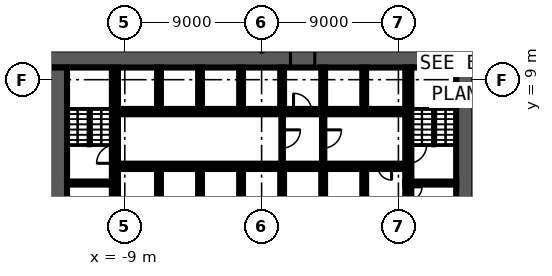
"""IFC4 building model, lengths in metres.
Left out: names, types, materials, properties, quantities, classifications, styles, units other than length and angle.
Written with IfcOpenShell. Run it as: python <this file> out.ifc"""

import sys

from ifc_helpers import new_model, si_unit, direction, frame, frame_2d, origin, place, context, subcontext, project, spatial, rectangle, extrude, element, fill, save


model = new_model("IFC4")
c1 = context("Model", 3, precision=1e-05, world=origin(), true_north=direction((0.0, 1.0)))
c2 = subcontext(c1, "Body", "Model", "MODEL_VIEW")
j1 = project(units=[si_unit("LENGTHUNIT", "METRE"), si_unit("PLANEANGLEUNIT", "RADIAN")], contexts=[c1])
p1 = place(None, origin())
s1 = spatial("IfcSite", under=j1, at=p1, CompositionType="ELEMENT")
p2 = place(p1, origin())
s2 = spatial("IfcBuilding", under=s1, at=p2, CompositionType="ELEMENT")
p3 = place(p2, frame((0.0, 0.0, -11.5)))
s3 = spatial("IfcBuildingStorey", under=s2, at=p3, CompositionType="ELEMENT", Elevation=-11.5)
p4 = place(p3, frame((-14.0, 10.4, 0.0), z_axis=(0.0, 0.0, 1.0), x_axis=(1.0, 0.0, 0.0)))
e1 = element("IfcWall", 1, at=p4, inside=s3, PredefinedType="SHEAR", context=c2, shape_type="SweptSolid", body=[
    extrude(rectangle(XDim=28.0, YDim=1.2, at=frame_2d((14.0, 0.0))), origin(), (0.0, 0.0, 1.0), 5.1),
])
p5 = place(p4, frame((15.9, 0.0, 0.0)))
e2 = element("IfcOpeningElement", 2, at=p5, cuts=e1, PredefinedType="OPENING", context=c2, shape_type="SweptSolid", body=[
    extrude(rectangle(XDim=1.6, YDim=2.1, at=frame_2d((0.8, 1.05))), frame((0.0, 0.61, 0.0), z_axis=(0.0, -1.0, 0.0), x_axis=(1.0, 0.0, 0.0)), (0.0, 0.0, 1.0), 1.22),
])
for number, where, z_axis, x_axis in (
    (3, (13.4, 9.8, 0.0), (0.0, 0.0, 1.0), (0.0, -1.0, 0.0)),
    (4, (-13.4, -9.8, 0.0), (0.0, 0.0, 1.0), (0.0, 1.0, 0.0)),
):
    element("IfcWall", number, at=place(p3, frame(where, z_axis=z_axis, x_axis=x_axis)), inside=s3, PredefinedType="SHEAR", context=c2, shape_type="SweptSolid", body=[
        extrude(rectangle(XDim=19.6, YDim=1.2, at=frame_2d((9.8, 0.0))), origin(), (0.0, 0.0, 1.0), 5.1),
    ])
p6 = place(p3, frame((9.65, 2.1, 0.0), z_axis=(0.0, 0.0, 1.0), x_axis=(0.0, -1.0, 0.0)))
e5 = element("IfcWall", 5, at=p6, inside=s3, PredefinedType="SHEAR", context=c2, shape_type="SweptSolid", body=[
    extrude(rectangle(XDim=4.2, YDim=0.4, at=frame_2d((2.1, 0.0))), origin(), (0.0, 0.0, 1.0), 5.1),
])
p7 = place(p6, frame((0.15, 0.0, 0.0)))
e6 = element("IfcOpeningElement", 6, at=p7, cuts=e5, PredefinedType="OPENING", context=c2, shape_type="SweptSolid", body=[
    extrude(rectangle(XDim=0.9, YDim=2.1, at=frame_2d((0.45, 1.05))), frame((0.0, 0.21, 0.0), z_axis=(0.0, -1.0, 0.0), x_axis=(1.0, 0.0, 0.0)), (0.0, 0.0, 1.0), 0.42),
])
p8 = place(p3, frame((9.65, 9.8, 0.0), z_axis=(0.0, 0.0, 1.0), x_axis=(0.0, -1.0, 0.0)))
e7 = element("IfcWall", 7, at=p8, inside=s3, PredefinedType="SHEAR", context=c2, shape_type="SweptSolid", body=[
    extrude(rectangle(XDim=7.5, YDim=0.4, at=frame_2d((3.75, 0.0))), origin(), (0.0, 0.0, 1.0), 5.1),
])
p9 = place(p8, frame((5.1, 0.0, 0.0)))
e8 = element("IfcOpeningElement", 8, at=p9, cuts=e7, PredefinedType="OPENING", context=c2, shape_type="SweptSolid", body=[
    extrude(rectangle(XDim=1.2, YDim=2.1, at=frame_2d((0.6, 1.05))), frame((0.0, 0.21, 0.0), z_axis=(0.0, -1.0, 0.0), x_axis=(1.0, 0.0, 0.0)), (0.0, 0.0, 1.0), 0.42),
])
p10 = place(p3, frame((-9.65, -2.1, 0.0), z_axis=(0.0, 0.0, 1.0), x_axis=(0.0, 1.0, 0.0)))
e9 = element("IfcWall", 9, at=p10, inside=s3, PredefinedType="SHEAR", context=c2, shape_type="SweptSolid", body=[
    extrude(rectangle(XDim=4.2, YDim=0.4, at=frame_2d((2.1, 0.0))), origin(), (0.0, 0.0, 1.0), 5.1),
])
p11 = place(p3, frame((-9.65, 2.3, 0.0), z_axis=(0.0, 0.0, 1.0), x_axis=(0.0, 1.0, 0.0)))
e10 = element("IfcWall", 10, at=p11, inside=s3, PredefinedType="SHEAR", context=c2, shape_type="SweptSolid", body=[
    extrude(rectangle(XDim=7.5, YDim=0.4, at=frame_2d((3.75, 0.0))), origin(), (0.0, 0.0, 1.0), 5.1),
])
p12 = place(p11, frame((1.2, 0.0, 0.0)))
e11 = element("IfcOpeningElement", 11, at=p12, cuts=e10, PredefinedType="OPENING", context=c2, shape_type="SweptSolid", body=[
    extrude(rectangle(XDim=1.2, YDim=2.1, at=frame_2d((0.6, 1.05))), frame((0.0, 0.21, 0.0), z_axis=(0.0, -1.0, 0.0), x_axis=(1.0, 0.0, 0.0)), (0.0, 0.0, 1.0), 0.42),
])
for number, where, z_axis, x_axis in (
    (12, (9.45, 2.2, 0.0), (0.0, 0.0, 1.0), (1.0, 0.0, 0.0)),
    (13, (-9.45, 2.2, 0.0), (0.0, 0.0, 1.0), (-1.0, 0.0, 0.0)),
):
    element("IfcWall", number, at=place(p3, frame(where, z_axis=z_axis, x_axis=x_axis)), inside=s3, PredefinedType="SHEAR", context=c2, shape_type="SweptSolid", body=[
        extrude(rectangle(XDim=3.35, YDim=0.2, at=frame_2d((1.675, 0.0))), origin(), (0.0, 0.0, 1.0), 5.1),
    ])
p13 = place(p3, frame((-9.45, 6.9, 0.0), z_axis=(0.0, 0.0, 1.0), x_axis=(1.0, 0.0, 0.0)))
e14 = element("IfcWall", 14, at=p13, inside=s3, PredefinedType="SHEAR", context=c2, shape_type="SweptSolid", body=[
    extrude(rectangle(XDim=18.9, YDim=0.35, at=frame_2d((9.45, 0.0))), origin(), (0.0, 0.0, 1.0), 5.1),
])
p14 = place(p13, frame((0.8, 0.0, 0.0)))
e15 = element("IfcOpeningElement", 15, at=p14, cuts=e14, PredefinedType="OPENING", context=c2, shape_type="SweptSolid", body=[
    extrude(rectangle(XDim=1.1, YDim=2.1, at=frame_2d((0.55, 1.05))), frame((0.0, 0.185, 0.0), z_axis=(0.0, -1.0, 0.0), x_axis=(1.0, 0.0, 0.0)), (0.0, 0.0, 1.0), 0.37),
])
p15 = place(p13, frame((3.5, 0.0, 0.0)))
e16 = element("IfcOpeningElement", 16, at=p15, cuts=e14, PredefinedType="OPENING", context=c2, shape_type="SweptSolid", body=[
    extrude(rectangle(XDim=1.1, YDim=2.1, at=frame_2d((0.55, 1.05))), frame((0.0, 0.185, 0.0), z_axis=(0.0, -1.0, 0.0), x_axis=(1.0, 0.0, 0.0)), (0.0, 0.0, 1.0), 0.37),
])
p16 = place(p13, frame((6.2, 0.0, 0.0)))
e17 = element("IfcOpeningElement", 17, at=p16, cuts=e14, PredefinedType="OPENING", context=c2, shape_type="SweptSolid", body=[
    extrude(rectangle(XDim=1.1, YDim=2.1, at=frame_2d((0.55, 1.05))), frame((0.0, 0.185, 0.0), z_axis=(0.0, -1.0, 0.0), x_axis=(1.0, 0.0, 0.0)), (0.0, 0.0, 1.0), 0.37),
])
p17 = place(p13, frame((8.9, 0.0, 0.0)))
e18 = element("IfcOpeningElement", 18, at=p17, cuts=e14, PredefinedType="OPENING", context=c2, shape_type="SweptSolid", body=[
    extrude(rectangle(XDim=1.1, YDim=2.1, at=frame_2d((0.55, 1.05))), frame((0.0, 0.185, 0.0), z_axis=(0.0, -1.0, 0.0), x_axis=(1.0, 0.0, 0.0)), (0.0, 0.0, 1.0), 0.37),
])
p18 = place(p13, frame((11.55, 0.0, 0.0)))
e19 = element("IfcOpeningElement", 19, at=p18, cuts=e14, PredefinedType="OPENING", context=c2, shape_type="SweptSolid", body=[
    extrude(rectangle(XDim=1.2, YDim=2.1, at=frame_2d((0.6, 1.05))), frame((0.0, 0.185, 0.0), z_axis=(0.0, -1.0, 0.0), x_axis=(1.0, 0.0, 0.0)), (0.0, 0.0, 1.0), 0.37),
])
p19 = place(p13, frame((14.3, 0.0, 0.0)))
e20 = element("IfcOpeningElement", 20, at=p19, cuts=e14, PredefinedType="OPENING", context=c2, shape_type="SweptSolid", body=[
    extrude(rectangle(XDim=1.1, YDim=2.1, at=frame_2d((0.55, 1.05))), frame((0.0, 0.185, 0.0), z_axis=(0.0, -1.0, 0.0), x_axis=(1.0, 0.0, 0.0)), (0.0, 0.0, 1.0), 0.37),
])
p20 = place(p13, frame((17.0, 0.0, 0.0)))
e21 = element("IfcOpeningElement", 21, at=p20, cuts=e14, PredefinedType="OPENING", context=c2, shape_type="SweptSolid", body=[
    extrude(rectangle(XDim=1.1, YDim=2.1, at=frame_2d((0.55, 1.05))), frame((0.0, 0.185, 0.0), z_axis=(0.0, -1.0, 0.0), x_axis=(1.0, 0.0, 0.0)), (0.0, 0.0, 1.0), 0.37),
])
p21 = place(p3, frame((9.45, 3.3, 0.0), z_axis=(0.0, 0.0, 1.0), x_axis=(-1.0, 0.0, 0.0)))
e22 = element("IfcWall", 22, at=p21, inside=s3, PredefinedType="SHEAR", context=c2, shape_type="SweptSolid", body=[
    extrude(rectangle(XDim=18.9, YDim=0.35, at=frame_2d((9.45, 0.0))), origin(), (0.0, 0.0, 1.0), 5.1),
])
p22 = place(p21, frame((6.2, 0.0, 0.0)))
e23 = element("IfcOpeningElement", 23, at=p22, cuts=e22, PredefinedType="OPENING", context=c2, shape_type="SweptSolid", body=[
    extrude(rectangle(XDim=1.1, YDim=2.1, at=frame_2d((0.55, 1.05))), frame((0.0, 0.185, 0.0), z_axis=(0.0, -1.0, 0.0), x_axis=(1.0, 0.0, 0.0)), (0.0, 0.0, 1.0), 0.37),
])
p23 = place(p21, frame((3.5, 0.0, 0.0)))
e24 = element("IfcOpeningElement", 24, at=p23, cuts=e22, PredefinedType="OPENING", context=c2, shape_type="SweptSolid", body=[
    extrude(rectangle(XDim=1.1, YDim=2.1, at=frame_2d((0.55, 1.05))), frame((0.0, 0.185, 0.0), z_axis=(0.0, -1.0, 0.0), x_axis=(1.0, 0.0, 0.0)), (0.0, 0.0, 1.0), 0.37),
])
p24 = place(p21, frame((0.9, 0.0, 0.0)))
e25 = element("IfcOpeningElement", 25, at=p24, cuts=e22, PredefinedType="OPENING", context=c2, shape_type="SweptSolid", body=[
    extrude(rectangle(XDim=0.9, YDim=2.1, at=frame_2d((0.45, 1.05))), frame((0.0, 0.185, 0.0), z_axis=(0.0, -1.0, 0.0), x_axis=(1.0, 0.0, 0.0)), (0.0, 0.0, 1.0), 0.37),
])
for number, where, z_axis, x_axis in (
    (26, (6.75, 0.4, 0.0), (0.0, 0.0, 1.0), (0.0, 1.0, 0.0)),
    (27, (6.75, 7.075, 0.0), (0.0, 0.0, 1.0), (0.0, 1.0, 0.0)),
):
    element("IfcWall", number, at=place(p3, frame(where, z_axis=z_axis, x_axis=x_axis)), inside=s3, PredefinedType="SOLIDWALL", context=c2, shape_type="SweptSolid", body=[
        extrude(rectangle(XDim=2.725, YDim=0.25, at=frame_2d((1.363, 0.0))), origin(), (0.0, 0.0, 1.0), 5.1),
    ])
p25 = place(p3, frame((4.05, 6.725, 0.0), z_axis=(0.0, 0.0, 1.0), x_axis=(0.0, -1.0, 0.0)))
e28 = element("IfcWall", 28, at=p25, inside=s3, PredefinedType="PARTITIONING", context=c2, shape_type="SweptSolid", body=[
    extrude(rectangle(XDim=3.25, YDim=0.15, at=frame_2d((1.625, 0.0))), origin(), (0.0, 0.0, 1.0), 5.1),
])
p26 = place(p25, frame((1.025, 0.0, 0.0)))
e29 = element("IfcOpeningElement", 29, at=p26, cuts=e28, PredefinedType="OPENING", context=c2, shape_type="SweptSolid", body=[
    extrude(rectangle(XDim=1.2, YDim=2.1, at=frame_2d((0.6, 1.05))), frame((0.0, 0.085, 0.0), z_axis=(0.0, -1.0, 0.0), x_axis=(1.0, 0.0, 0.0)), (0.0, 0.0, 1.0), 0.17),
])
for number, where, z_axis, x_axis in (
    (30, (4.05, 0.4, 0.0), (0.0, 0.0, 1.0), (0.0, 1.0, 0.0)),
    (31, (4.05, 7.075, 0.0), (0.0, 0.0, 1.0), (0.0, 1.0, 0.0)),
):
    element("IfcWall", number, at=place(p3, frame(where, z_axis=z_axis, x_axis=x_axis)), inside=s3, PredefinedType="SOLIDWALL", context=c2, shape_type="SweptSolid", body=[
        extrude(rectangle(XDim=2.725, YDim=0.25, at=frame_2d((1.363, 0.0))), origin(), (0.0, 0.0, 1.0), 5.1),
    ])
p27 = place(p3, frame((1.35, 6.725, 0.0), z_axis=(0.0, 0.0, 1.0), x_axis=(0.0, -1.0, 0.0)))
e32 = element("IfcWall", 32, at=p27, inside=s3, PredefinedType="PARTITIONING", context=c2, shape_type="SweptSolid", body=[
    extrude(rectangle(XDim=3.25, YDim=0.1, at=frame_2d((1.625, 0.0))), origin(), (0.0, 0.0, 1.0), 5.1),
])
p28 = place(p27, frame((1.025, 0.0, 0.0)))
e33 = element("IfcOpeningElement", 33, at=p28, cuts=e32, PredefinedType="OPENING", context=c2, shape_type="SweptSolid", body=[
    extrude(rectangle(XDim=1.2, YDim=2.1, at=frame_2d((0.6, 1.05))), frame((0.0, 0.06, 0.0), z_axis=(0.0, -1.0, 0.0), x_axis=(1.0, 0.0, 0.0)), (0.0, 0.0, 1.0), 0.12),
])
p29 = place(p3, frame((1.35, 0.4, 0.0), z_axis=(0.0, 0.0, 1.0), x_axis=(0.0, 1.0, 0.0)))
e34 = element("IfcWall", 34, at=p29, inside=s3, PredefinedType="SHEAR", context=c2, shape_type="SweptSolid", body=[
    extrude(rectangle(XDim=2.725, YDim=0.25, at=frame_2d((1.363, 0.0))), origin(), (0.0, 0.0, 1.0), 5.1),
])
p30 = place(p3, frame((1.35, 7.075, 0.0), z_axis=(0.0, 0.0, 1.0), x_axis=(0.0, 1.0, 0.0)))
e35 = element("IfcWall", 35, at=p30, inside=s3, PredefinedType="SOLIDWALL", context=c2, shape_type="SweptSolid", body=[
    extrude(rectangle(XDim=2.725, YDim=0.25, at=frame_2d((1.363, 0.0))), origin(), (0.0, 0.0, 1.0), 5.1),
])
p31 = place(p3, frame((-1.35, 0.4, 0.0), z_axis=(0.0, 0.0, 1.0), x_axis=(0.0, 1.0, 0.0)))
e36 = element("IfcWall", 36, at=p31, inside=s3, PredefinedType="SHEAR", context=c2, shape_type="SweptSolid", body=[
    extrude(rectangle(XDim=2.725, YDim=0.25, at=frame_2d((1.363, 0.0))), origin(), (0.0, 0.0, 1.0), 5.1),
])
p32 = place(p3, frame((-1.35, 7.075, 0.0), z_axis=(0.0, 0.0, 1.0), x_axis=(0.0, 1.0, 0.0)))
e37 = element("IfcWall", 37, at=p32, inside=s3, PredefinedType="SOLIDWALL", context=c2, shape_type="SweptSolid", body=[
    extrude(rectangle(XDim=2.725, YDim=0.25, at=frame_2d((1.363, 0.0))), origin(), (0.0, 0.0, 1.0), 5.1),
])
p33 = place(p3, frame((-4.05, 0.4, 0.0), z_axis=(0.0, 0.0, 1.0), x_axis=(0.0, 1.0, 0.0)))
e38 = element("IfcWall", 38, at=p33, inside=s3, PredefinedType="SHEAR", context=c2, shape_type="SweptSolid", body=[
    extrude(rectangle(XDim=2.725, YDim=0.25, at=frame_2d((1.363, 0.0))), origin(), (0.0, 0.0, 1.0), 5.1),
])
p34 = place(p3, frame((-4.05, 7.075, 0.0), z_axis=(0.0, 0.0, 1.0), x_axis=(0.0, 1.0, 0.0)))
e39 = element("IfcWall", 39, at=p34, inside=s3, PredefinedType="SOLIDWALL", context=c2, shape_type="SweptSolid", body=[
    extrude(rectangle(XDim=2.725, YDim=0.25, at=frame_2d((1.363, 0.0))), origin(), (0.0, 0.0, 1.0), 5.1),
])
p35 = place(p3, frame((-6.75, 0.4, 0.0), z_axis=(0.0, 0.0, 1.0), x_axis=(0.0, 1.0, 0.0)))
e40 = element("IfcWall", 40, at=p35, inside=s3, PredefinedType="SHEAR", context=c2, shape_type="SweptSolid", body=[
    extrude(rectangle(XDim=2.725, YDim=0.25, at=frame_2d((1.363, 0.0))), origin(), (0.0, 0.0, 1.0), 5.1),
])
p36 = place(p3, frame((-6.75, 7.075, 0.0), z_axis=(0.0, 0.0, 1.0), x_axis=(0.0, 1.0, 0.0)))
e41 = element("IfcWall", 41, at=p36, inside=s3, PredefinedType="SOLIDWALL", context=c2, shape_type="SweptSolid", body=[
    extrude(rectangle(XDim=2.725, YDim=0.25, at=frame_2d((1.363, 0.0))), origin(), (0.0, 0.0, 1.0), 5.1),
])
p37 = place(p7, origin())
e42 = element("IfcDoor", 42, at=p37, inside=s3, OperationType="SINGLE_SWING_RIGHT", PredefinedType="DOOR", context=c2, shape_type="SweptSolid", body=[
    extrude(rectangle(XDim=0.9, YDim=2.1, at=frame_2d((0.45, 1.05))), frame((0.0, 0.025, 0.0), z_axis=(0.0, -1.0, 0.0), x_axis=(1.0, 0.0, 0.0)), (0.0, 0.0, 1.0), 0.05),
])
fill(e6, e42)
p38 = place(p14, origin())
e43 = element("IfcDoor", 43, at=p38, inside=s3, OperationType="DOUBLE_DOOR_SLIDING", PredefinedType="DOOR", context=c2, shape_type="SweptSolid", body=[
    extrude(rectangle(XDim=1.1, YDim=2.1, at=frame_2d((0.55, 1.05))), frame((0.0, 0.025, 0.0), z_axis=(0.0, -1.0, 0.0), x_axis=(1.0, 0.0, 0.0)), (0.0, 0.0, 1.0), 0.05),
])
fill(e15, e43)
p39 = place(p15, origin())
e44 = element("IfcDoor", 44, at=p39, inside=s3, OperationType="DOUBLE_DOOR_SLIDING", PredefinedType="DOOR", context=c2, shape_type="SweptSolid", body=[
    extrude(rectangle(XDim=1.1, YDim=2.1, at=frame_2d((0.55, 1.05))), frame((0.0, 0.025, 0.0), z_axis=(0.0, -1.0, 0.0), x_axis=(1.0, 0.0, 0.0)), (0.0, 0.0, 1.0), 0.05),
])
fill(e16, e44)
p40 = place(p16, origin())
e45 = element("IfcDoor", 45, at=p40, inside=s3, OperationType="DOUBLE_DOOR_SLIDING", PredefinedType="DOOR", context=c2, shape_type="SweptSolid", body=[
    extrude(rectangle(XDim=1.1, YDim=2.1, at=frame_2d((0.55, 1.05))), frame((0.0, 0.025, 0.0), z_axis=(0.0, -1.0, 0.0), x_axis=(1.0, 0.0, 0.0)), (0.0, 0.0, 1.0), 0.05),
])
fill(e17, e45)
p41 = place(p17, origin())
e46 = element("IfcDoor", 46, at=p41, inside=s3, OperationType="DOUBLE_DOOR_SLIDING", PredefinedType="DOOR", context=c2, shape_type="SweptSolid", body=[
    extrude(rectangle(XDim=1.1, YDim=2.1, at=frame_2d((0.55, 1.05))), frame((0.0, 0.025, 0.0), z_axis=(0.0, -1.0, 0.0), x_axis=(1.0, 0.0, 0.0)), (0.0, 0.0, 1.0), 0.05),
])
fill(e18, e46)
p42 = place(p5, origin())
e47 = element("IfcDoor", 47, at=p42, inside=s3, OperationType="DOUBLE_DOOR_SINGLE_SWING", PredefinedType="DOOR", context=c2, shape_type="SweptSolid", body=[
    extrude(rectangle(XDim=1.6, YDim=2.1, at=frame_2d((0.8, 1.05))), frame((0.0, 0.025, 0.0), z_axis=(0.0, -1.0, 0.0), x_axis=(1.0, 0.0, 0.0)), (0.0, 0.0, 1.0), 0.05),
])
fill(e2, e47)
p43 = place(p18, origin())
e48 = element("IfcDoor", 48, at=p43, inside=s3, OperationType="SINGLE_SWING_LEFT", PredefinedType="DOOR", context=c2, shape_type="SweptSolid", body=[
    extrude(rectangle(XDim=1.2, YDim=2.1, at=frame_2d((0.6, 1.05))), frame((0.0, 0.025, 0.0), z_axis=(0.0, -1.0, 0.0), x_axis=(1.0, 0.0, 0.0)), (0.0, 0.0, 1.0), 0.05),
])
fill(e19, e48)
p44 = place(p19, origin())
e49 = element("IfcDoor", 49, at=p44, inside=s3, OperationType="DOUBLE_DOOR_SLIDING", PredefinedType="DOOR", context=c2, shape_type="SweptSolid", body=[
    extrude(rectangle(XDim=1.1, YDim=2.1, at=frame_2d((0.55, 1.05))), frame((0.0, 0.025, 0.0), z_axis=(0.0, -1.0, 0.0), x_axis=(1.0, 0.0, 0.0)), (0.0, 0.0, 1.0), 0.05),
])
fill(e20, e49)
p45 = place(p20, origin())
e50 = element("IfcDoor", 50, at=p45, inside=s3, OperationType="DOUBLE_DOOR_SLIDING", PredefinedType="DOOR", context=c2, shape_type="SweptSolid", body=[
    extrude(rectangle(XDim=1.1, YDim=2.1, at=frame_2d((0.55, 1.05))), frame((0.0, 0.025, 0.0), z_axis=(0.0, -1.0, 0.0), x_axis=(1.0, 0.0, 0.0)), (0.0, 0.0, 1.0), 0.05),
])
fill(e21, e50)
p46 = place(p22, origin())
e51 = element("IfcDoor", 51, at=p46, inside=s3, OperationType="DOUBLE_DOOR_SLIDING", PredefinedType="DOOR", context=c2, shape_type="SweptSolid", body=[
    extrude(rectangle(XDim=1.1, YDim=2.1, at=frame_2d((0.55, 1.05))), frame((0.0, 0.025, 0.0), z_axis=(0.0, -1.0, 0.0), x_axis=(1.0, 0.0, 0.0)), (0.0, 0.0, 1.0), 0.05),
])
fill(e23, e51)
p47 = place(p23, origin())
e52 = element("IfcDoor", 52, at=p47, inside=s3, OperationType="DOUBLE_DOOR_SLIDING", PredefinedType="DOOR", context=c2, shape_type="SweptSolid", body=[
    extrude(rectangle(XDim=1.1, YDim=2.1, at=frame_2d((0.55, 1.05))), frame((0.0, 0.025, 0.0), z_axis=(0.0, -1.0, 0.0), x_axis=(1.0, 0.0, 0.0)), (0.0, 0.0, 1.0), 0.05),
])
fill(e24, e52)
p48 = place(p24, origin())
e53 = element("IfcDoor", 53, at=p48, inside=s3, OperationType="SINGLE_SWING_LEFT", PredefinedType="DOOR", context=c2, shape_type="SweptSolid", body=[
    extrude(rectangle(XDim=0.9, YDim=2.1, at=frame_2d((0.45, 1.05))), frame((0.0, 0.025, 0.0), z_axis=(0.0, -1.0, 0.0), x_axis=(1.0, 0.0, 0.0)), (0.0, 0.0, 1.0), 0.05),
])
fill(e25, e53)
p49 = place(p9, origin())
e54 = element("IfcDoor", 54, at=p49, inside=s3, OperationType="SINGLE_SWING_LEFT", PredefinedType="DOOR", context=c2, shape_type="SweptSolid", body=[
    extrude(rectangle(XDim=1.2, YDim=2.1, at=frame_2d((0.6, 1.05))), frame((0.0, 0.025, 0.0), z_axis=(0.0, -1.0, 0.0), x_axis=(1.0, 0.0, 0.0)), (0.0, 0.0, 1.0), 0.05),
])
fill(e8, e54)
p50 = place(p12, origin())
e55 = element("IfcDoor", 55, at=p50, inside=s3, OperationType="SINGLE_SWING_RIGHT", PredefinedType="DOOR", context=c2, shape_type="SweptSolid", body=[
    extrude(rectangle(XDim=1.2, YDim=2.1, at=frame_2d((0.6, 1.05))), frame((0.0, 0.025, 0.0), z_axis=(0.0, -1.0, 0.0), x_axis=(1.0, 0.0, 0.0)), (0.0, 0.0, 1.0), 0.05),
])
fill(e11, e55)
p51 = place(p28, origin())
e56 = element("IfcDoor", 56, at=p51, inside=s3, OperationType="SINGLE_SWING_LEFT", PredefinedType="DOOR", context=c2, shape_type="SweptSolid", body=[
    extrude(rectangle(XDim=1.2, YDim=2.1, at=frame_2d((0.6, 1.05))), frame((0.0, 0.025, 0.0), z_axis=(0.0, -1.0, 0.0), x_axis=(1.0, 0.0, 0.0)), (0.0, 0.0, 1.0), 0.05),
])
fill(e33, e56)
p52 = place(p26, origin())
e57 = element("IfcDoor", 57, at=p52, inside=s3, OperationType="SINGLE_SWING_RIGHT", PredefinedType="DOOR", context=c2, shape_type="SweptSolid", body=[
    extrude(rectangle(XDim=1.2, YDim=2.1, at=frame_2d((0.6, 1.05))), frame((0.0, 0.025, 0.0), z_axis=(0.0, -1.0, 0.0), x_axis=(1.0, 0.0, 0.0)), (0.0, 0.0, 1.0), 0.05),
])
fill(e29, e57)
save(model, sys.argv[1])
